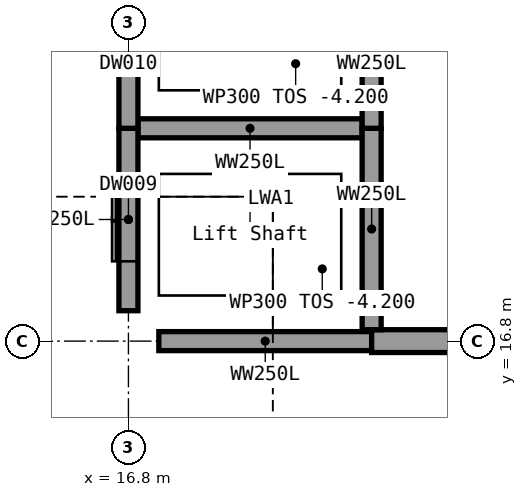
"""IFC4 building model, lengths in metres.
Left out: names, types, materials, properties, quantities, classifications, styles, units other than length and angle.
Written with IfcOpenShell. Run it as: python <this file> out.ifc"""

import sys

from ifc_helpers import new_model, si_unit, direction, frame, frame_2d, origin, origin_2d, place, context, subcontext, project, spatial, rectangle, extrude, element, fill, save


model = new_model("IFC4")
c1 = context("Model", 3, precision=1e-05, world=origin(), true_north=direction((0.0, 1.0)))
c2 = subcontext(c1, "Body", "Model", "MODEL_VIEW")
j1 = project(units=[si_unit("LENGTHUNIT", "METRE"), si_unit("PLANEANGLEUNIT", "RADIAN")], contexts=[c1])
p1 = place(None, origin())
s1 = spatial("IfcSite", under=j1, at=p1, CompositionType="ELEMENT")
p2 = place(p1, origin())
s2 = spatial("IfcBuilding", under=s1, at=p2, CompositionType="ELEMENT")
p3 = place(p2, frame((0.0, 0.0, -3.0)))
s3 = spatial("IfcBuildingStorey", under=s2, at=p3, CompositionType="ELEMENT", Elevation=-3.0)
p4 = place(p3, frame((16.8, 16.8, 0.0), z_axis=(0.0, 0.0, 1.0), x_axis=(1.0, 0.0, 0.0)))
e1 = element("IfcColumn", 1, at=p4, inside=s3, PredefinedType="COLUMN", context=c2, shape_type="SweptSolid", body=[
    extrude(rectangle(XDim=0.8, YDim=0.8, at=origin_2d()), origin(), (0.0, 0.0, 1.0), 3.0),
])
p5 = place(p3, frame((17.2, 16.8, -1.2), z_axis=(0.0, 0.0, 1.0), x_axis=(1.0, 0.0, 0.0)))
e2 = element("IfcWall", 2, at=p5, inside=s3, PredefinedType="SHEAR", context=c2, shape_type="SweptSolid", body=[
    extrude(rectangle(XDim=2.8, YDim=0.25, at=frame_2d((1.4, 0.0))), origin(), (0.0, 0.0, 1.0), 3.74),
])
p6 = place(p3, frame((20.0, 16.8, 0.0), z_axis=(0.0, 0.0, 1.0), x_axis=(1.0, 0.0, 0.0)))
e3 = element("IfcWall", 3, at=p6, inside=s3, PredefinedType="SHEAR", context=c2, shape_type="SweptSolid", body=[
    extrude(rectangle(XDim=4.8, YDim=0.3, at=frame_2d((2.4, 0.0))), origin(), (0.0, 0.0, 1.0), 2.54),
])
p7 = place(p6, frame((1.9, 0.0, 0.0)))
e4 = element("IfcOpeningElement", 4, at=p7, cuts=e3, PredefinedType="OPENING", context=c2, shape_type="SweptSolid", body=[
    extrude(rectangle(XDim=1.0, YDim=2.1, at=frame_2d((0.5, 1.05))), frame((0.0, 0.15, 0.0), z_axis=(0.0, -1.0, 0.0), x_axis=(1.0, 0.0, 0.0)), (0.0, 0.0, 1.0), 0.3),
])
p8 = place(p3, frame((16.925, 19.6, -1.2), z_axis=(0.0, 0.0, 1.0), x_axis=(1.0, 0.0, 0.0)))
e5 = element("IfcWall", 5, at=p8, inside=s3, PredefinedType="SHEAR", context=c2, shape_type="SweptSolid", body=[
    extrude(rectangle(XDim=2.95, YDim=0.25, at=frame_2d((1.475, 0.0))), origin(), (0.0, 0.0, 1.0), 3.74),
])
p9 = place(p3, frame((16.8, 17.2, -1.2), z_axis=(0.0, 0.0, 1.0), x_axis=(0.0, 1.0, 0.0)))
e6 = element("IfcWall", 6, at=p9, inside=s3, PredefinedType="SHEAR", context=c2, shape_type="SweptSolid", body=[
    extrude(rectangle(XDim=2.4, YDim=0.25, at=frame_2d((1.2, 0.0))), origin(), (0.0, 0.0, 1.0), 3.74),
])
p10 = place(p9, frame((0.65, 0.0, 1.2)))
e7 = element("IfcOpeningElement", 7, at=p10, cuts=e6, PredefinedType="OPENING", context=c2, shape_type="SweptSolid", body=[
    extrude(rectangle(XDim=1.1, YDim=2.1, at=frame_2d((0.55, 1.05))), frame((0.0, 0.125, 0.0), z_axis=(0.0, -1.0, 0.0), x_axis=(1.0, 0.0, 0.0)), (0.0, 0.0, 1.0), 0.25),
])
p11 = place(p3, frame((16.8, 19.6, -1.2), z_axis=(0.0, 0.0, 1.0), x_axis=(0.0, 1.0, 0.0)))
e8 = element("IfcWall", 8, at=p11, inside=s3, PredefinedType="SHEAR", context=c2, shape_type="SweptSolid", body=[
    extrude(rectangle(XDim=2.6, YDim=0.25, at=frame_2d((1.3, 0.0))), origin(), (0.0, 0.0, 1.0), 3.74),
])
p12 = place(p11, frame((0.75, 0.0, 1.2)))
e9 = element("IfcOpeningElement", 9, at=p12, cuts=e8, PredefinedType="OPENING", context=c2, shape_type="SweptSolid", body=[
    extrude(rectangle(XDim=1.1, YDim=2.1, at=frame_2d((0.55, 1.05))), frame((0.0, 0.125, 0.0), z_axis=(0.0, -1.0, 0.0), x_axis=(1.0, 0.0, 0.0)), (0.0, 0.0, 1.0), 0.25),
])
p13 = place(p3, frame((20.0, 16.95, -1.2), z_axis=(0.0, 0.0, 1.0), x_axis=(0.0, 1.0, 0.0)))
e10 = element("IfcWall", 10, at=p13, inside=s3, PredefinedType="SHEAR", context=c2, shape_type="SweptSolid", body=[
    extrude(rectangle(XDim=2.65, YDim=0.25, at=frame_2d((1.325, 0.0))), origin(), (0.0, 0.0, 1.0), 3.74),
])
p14 = place(p3, frame((20.0, 19.6, -1.2), z_axis=(0.0, 0.0, 1.0), x_axis=(0.0, 1.0, 0.0)))
e11 = element("IfcWall", 11, at=p14, inside=s3, PredefinedType="SHEAR", context=c2, shape_type="SweptSolid", body=[
    extrude(rectangle(XDim=2.6, YDim=0.25, at=frame_2d((1.3, 0.0))), origin(), (0.0, 0.0, 1.0), 3.74),
])
p15 = place(p10, origin())
e12 = element("IfcDoor", 12, at=p15, inside=s3, OperationType="DOUBLE_DOOR_SLIDING", PredefinedType="DOOR", context=c2, shape_type="SweptSolid", body=[
    extrude(rectangle(XDim=1.1, YDim=2.1, at=frame_2d((0.55, 1.05))), frame((0.0, 0.025, 0.0), z_axis=(0.0, -1.0, 0.0), x_axis=(1.0, 0.0, 0.0)), (0.0, 0.0, 1.0), 0.05),
])
fill(e7, e12)
p16 = place(p12, origin())
e13 = element("IfcDoor", 13, at=p16, inside=s3, OperationType="DOUBLE_DOOR_SLIDING", PredefinedType="DOOR", context=c2, shape_type="SweptSolid", body=[
    extrude(rectangle(XDim=1.1, YDim=2.1, at=frame_2d((0.55, 1.05))), frame((0.0, 0.025, 0.0), z_axis=(0.0, -1.0, 0.0), x_axis=(1.0, 0.0, 0.0)), (0.0, 0.0, 1.0), 0.05),
])
fill(e9, e13)
save(model, sys.argv[1])
